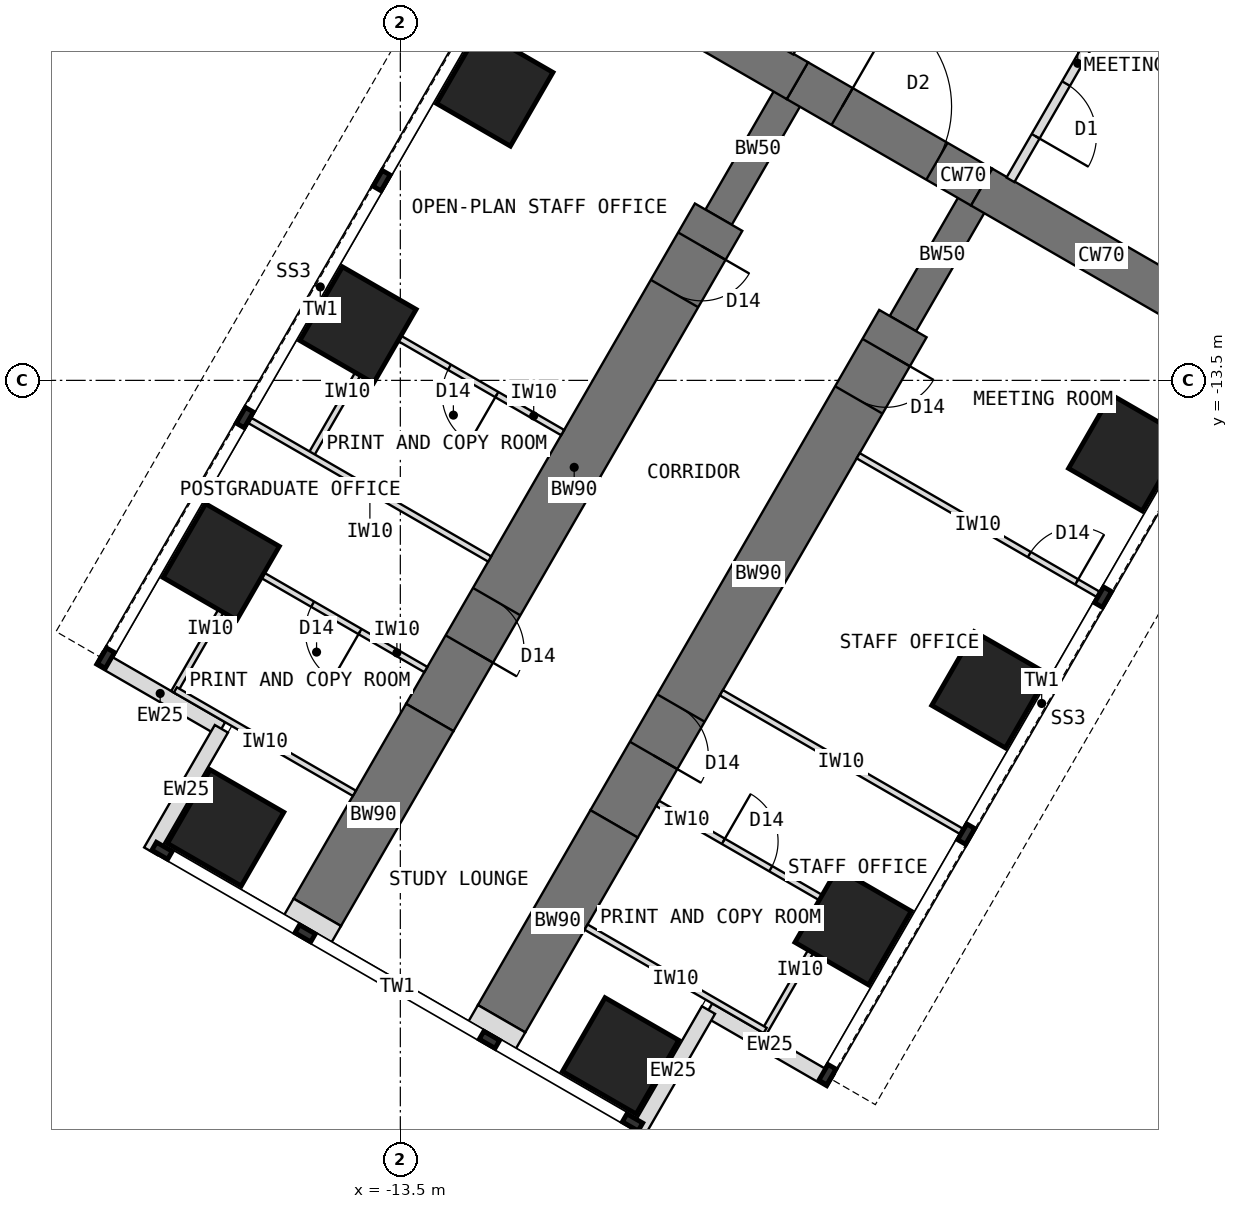
"""IFC4 building model, lengths in metres.
Left out: names, types, materials, properties, quantities, classifications, styles, units other than length and angle.
Written with IfcOpenShell. Run it as: python <this file> out.ifc"""

import sys

from ifc_helpers import new_model, si_unit, direction, frame, frame_2d, origin, origin_2d, place, context, subcontext, project, spatial, rectangle, extrude, element, fill, save


model = new_model("IFC4")
c1 = context("Model", 3, precision=1e-05, world=origin(), true_north=direction((0.0, 1.0)))
c2 = subcontext(c1, "Body", "Model", "MODEL_VIEW")
j1 = project(units=[si_unit("LENGTHUNIT", "METRE"), si_unit("PLANEANGLEUNIT", "RADIAN")], contexts=[c1])
p1 = place(None, origin())
s1 = spatial("IfcSite", under=j1, at=p1, CompositionType="ELEMENT")
p2 = place(p1, origin())
s2 = spatial("IfcBuilding", under=s1, at=p2, CompositionType="ELEMENT")
p3 = place(p2, frame((0.0, 0.0, 84.5)))
s3 = spatial("IfcBuildingStorey", under=s2, at=p3, CompositionType="ELEMENT", Elevation=84.5)
p4 = place(p3, frame((-10.908, -6.298, 0.0), z_axis=(0.0, 0.0, 1.0), x_axis=(0.866034513004, -0.499984222037, 0.0)))
e1 = element("IfcWall", 1, at=p4, inside=s3, PredefinedType="SHEAR", context=c2, shape_type="SweptSolid", body=[
    extrude(rectangle(XDim=4.548, YDim=0.7, at=frame_2d((2.274, 0.0))), origin(), (0.0, 0.0, 1.0), 4.0),
])
p5 = place(p3, frame((-6.97, -8.572, 0.0), z_axis=(0.0, 0.0, 1.0), x_axis=(0.866019471182, -0.500010275428, 0.0)))
e2 = element("IfcWall", 2, at=p5, inside=s3, PredefinedType="SHEAR", context=c2, shape_type="SweptSolid", body=[
    extrude(rectangle(XDim=3.5, YDim=0.7, at=frame_2d((1.75, 0.0))), origin(), (0.0, 0.0, 1.0), 4.0),
])
p6 = place(p5, frame((0.85, 0.0, 0.0)))
e3 = element("IfcOpeningElement", 3, at=p6, cuts=e2, PredefinedType="OPENING", context=c2, shape_type="SweptSolid", body=[
    extrude(rectangle(XDim=1.8, YDim=2.1, at=frame_2d((0.9, 1.05))), frame((0.0, 0.36, 0.0), z_axis=(0.0, -1.0, 0.0), x_axis=(1.0, 0.0, 0.0)), (0.0, 0.0, 1.0), 0.72),
])
p7 = place(p3, frame((-3.939, -10.322, 0.0), z_axis=(0.0, 0.0, 1.0), x_axis=(0.866011268655, -0.500024481964, 0.0)))
e4 = element("IfcWall", 4, at=p7, inside=s3, PredefinedType="SHEAR", context=c2, shape_type="SweptSolid", body=[
    extrude(rectangle(XDim=4.548, YDim=0.7, at=frame_2d((2.274, 0.0))), origin(), (0.0, 0.0, 1.0), 4.0),
])
p8 = place(p3, frame((-3.939, -10.322, 0.0), z_axis=(0.0, 0.0, 1.0), x_axis=(-0.499918158782, -0.866072649678, 0.0)))
e5 = element("IfcWall", 5, at=p8, inside=s3, PredefinedType="SHEAR", context=c2, shape_type="SweptSolid", body=[
    extrude(rectangle(XDim=2.592, YDim=0.5, at=frame_2d((1.296, 0.0))), origin(), (0.0, 0.0, 1.0), 4.0),
])
p9 = place(p3, frame((-5.234, -12.566, 0.0), z_axis=(0.0, 0.0, 1.0), x_axis=(-0.499997557548, -0.86602681393, 0.0)))
e6 = element("IfcWall", 6, at=p9, inside=s3, PredefinedType="SHEAR", context=c2, shape_type="SweptSolid", body=[
    extrude(rectangle(XDim=9.5, YDim=0.9, at=frame_2d((4.75, 0.0))), origin(), (0.0, 0.0, 1.0), 4.0),
])
p10 = place(p9, frame((0.55, 0.0, 0.0)))
e7 = element("IfcOpeningElement", 7, at=p10, cuts=e6, PredefinedType="OPENING", context=c2, shape_type="SweptSolid", body=[
    extrude(rectangle(XDim=0.9, YDim=2.1, at=frame_2d((0.45, 1.05))), frame((0.0, 0.46, 0.0), z_axis=(0.0, -1.0, 0.0), x_axis=(1.0, 0.0, 0.0)), (0.0, 0.0, 1.0), 0.92),
])
p11 = place(p9, frame((7.3, 0.0, 0.0)))
e8 = element("IfcOpeningElement", 8, at=p11, cuts=e6, PredefinedType="OPENING", context=c2, shape_type="SweptSolid", body=[
    extrude(rectangle(XDim=0.9, YDim=2.1, at=frame_2d((0.45, 1.05))), frame((0.0, 0.46, 0.0), z_axis=(0.0, -1.0, 0.0), x_axis=(1.0, 0.0, 0.0)), (0.0, 0.0, 1.0), 0.92),
])
p12 = place(p3, frame((-9.984, -20.794, 0.0), z_axis=(0.0, 0.0, 1.0), x_axis=(-0.500042316284, -0.866000971088, 0.0)))
e9 = element("IfcWall", 9, at=p12, inside=s3, PredefinedType="SHEAR", context=c2, shape_type="SweptSolid", body=[
    extrude(rectangle(XDim=3.7, YDim=0.9, at=frame_2d((1.85, 0.0))), origin(), (0.0, 0.0, 1.0), 4.0),
])
p13 = place(p3, frame((-6.97, -8.572, 0.0), z_axis=(0.0, 0.0, 1.0), x_axis=(-0.499988811324, -0.866031863473, 0.0)))
e10 = element("IfcWall", 10, at=p13, inside=s3, PredefinedType="SHEAR", context=c2, shape_type="SweptSolid", body=[
    extrude(rectangle(XDim=2.592, YDim=0.5, at=frame_2d((1.296, 0.0))), origin(), (0.0, 0.0, 1.0), 4.0),
])
p14 = place(p3, frame((-8.266, -10.816, 0.0), z_axis=(0.0, 0.0, 1.0), x_axis=(-0.499997557548, -0.86602681393, 0.0)))
e11 = element("IfcWall", 11, at=p14, inside=s3, PredefinedType="SHEAR", context=c2, shape_type="SweptSolid", body=[
    extrude(rectangle(XDim=9.5, YDim=0.9, at=frame_2d((4.75, 0.0))), origin(), (0.0, 0.0, 1.0), 4.0),
])
p15 = place(p14, frame((0.55, 0.0, 0.0)))
e12 = element("IfcOpeningElement", 12, at=p15, cuts=e11, PredefinedType="OPENING", context=c2, shape_type="SweptSolid", body=[
    extrude(rectangle(XDim=0.9, YDim=2.1, at=frame_2d((0.45, 1.05))), frame((0.0, 0.46, 0.0), z_axis=(0.0, -1.0, 0.0), x_axis=(1.0, 0.0, 0.0)), (0.0, 0.0, 1.0), 0.92),
])
p16 = place(p14, frame((7.3, 0.0, 0.0)))
e13 = element("IfcOpeningElement", 13, at=p16, cuts=e11, PredefinedType="OPENING", context=c2, shape_type="SweptSolid", body=[
    extrude(rectangle(XDim=0.9, YDim=2.1, at=frame_2d((0.45, 1.05))), frame((0.0, 0.46, 0.0), z_axis=(0.0, -1.0, 0.0), x_axis=(1.0, 0.0, 0.0)), (0.0, 0.0, 1.0), 0.92),
])
p17 = place(p3, frame((-13.016, -19.044, 0.0), z_axis=(0.0, 0.0, 1.0), x_axis=(-0.499992827086, -0.866029545028, 0.0)))
e14 = element("IfcWall", 14, at=p17, inside=s3, PredefinedType="SHEAR", context=c2, shape_type="SweptSolid", body=[
    extrude(rectangle(XDim=3.7, YDim=0.9, at=frame_2d((1.85, 0.0))), origin(), (0.0, 0.0, 1.0), 4.0),
])
for number, where, z_axis, x_axis in (
    (15, (-1.554, -14.691, 0.0), (0.0, 0.0, 1.0), (0.5, 0.866, 0.0)),
    (16, (-11.946, -8.691, 0.0), (0.0, 0.0, 1.0), (0.5, 0.866, 0.0)),
    (17, (-3.804, -18.588, 0.0), (0.0, 0.0, 1.0), (0.5, 0.866, 0.0)),
    (18, (-14.196, -12.588, 0.0), (0.0, 0.0, 1.0), (0.5, 0.866, 0.0)),
    (19, (-6.054, -22.486, 0.0), (0.0, 0.0, 1.0), (0.5, 0.866, 0.0)),
    (20, (-16.446, -16.486, 0.0), (0.0, 0.0, 1.0), (0.5, 0.866, 0.0)),
    (21, (-9.877, -24.608, 0.0), (0.0, 0.0, 1.0), (0.5, 0.866, 0.0)),
    (22, (-16.373, -20.858, 0.0), (0.0, 0.0, 1.0), (0.5, 0.866, 0.0)),
):
    element("IfcColumn", number, at=place(p3, frame(where, z_axis=z_axis, x_axis=x_axis)), inside=s3, PredefinedType="COLUMN", context=c2, shape_type="SweptSolid", body=[
        extrude(rectangle(XDim=1.4, YDim=1.4, at=origin_2d()), origin(), (0.0, 0.0, 1.0), 4.0),
    ])
for number, where, z_axis, x_axis in (
    (23, (-6.419, -25.017, 0.0), (0.0, 0.0, 1.0), (-0.866, 0.5, 0.0)),
    (24, (-8.432, -23.855, 0.0), (0.0, 0.0, 1.0), (-0.5, -0.866, 0.0)),
    (25, (-18.456, -18.067, 0.0), (0.0, 0.0, 1.0), (0.866, -0.5, 0.0)),
    (26, (-16.443, -19.23, 0.0), (0.0, 0.0, 1.0), (-0.5, -0.866, 0.0)),
):
    element("IfcWall", number, at=place(p3, frame(where, z_axis=z_axis, x_axis=x_axis)), inside=s3, PredefinedType="STANDARD", context=c2, shape_type="SweptSolid", body=[
        extrude(rectangle(XDim=2.325, YDim=0.25, at=frame_2d((1.163, 0.0))), origin(), (0.0, 0.0, 1.0), 3.8),
    ])
for number, where, z_axis, x_axis in (
    (27, (-11.834, -23.998, 0.0), (0.0, 0.0, 1.0), (-0.5, -0.866, 0.0)),
    (28, (-14.865, -22.248, 0.0), (0.0, 0.0, 1.0), (-0.5, -0.866, 0.0)),
):
    element("IfcWall", number, at=place(p3, frame(where, z_axis=z_axis, x_axis=x_axis)), inside=s3, PredefinedType="PARTITIONING", context=c2, shape_type="SweptSolid", body=[
        extrude(rectangle(XDim=0.31, YDim=0.9, at=frame_2d((0.155, 0.0))), origin(), (0.0, 0.0, 1.0), 3.8),
    ])
p18 = place(p3, frame((-1.201, -6.12, 0.0), z_axis=(0.0, 0.0, 1.0), x_axis=(0.500002627198, -0.866023886965, 0.0)))
e29 = element("IfcWall", 29, at=p18, inside=s3, PredefinedType="SHEAR", context=c2, shape_type="SweptSolid", body=[
    extrude(rectangle(XDim=5.858, YDim=0.4, at=frame_2d((2.929, 0.0))), origin(), (0.0, 0.0, 1.0), 4.0),
])
p19 = place(p3, frame((-5.97, -14.74, 0.0), z_axis=(0.0, 0.0, 1.0), x_axis=(0.866035472144, -0.499982560684, 0.0)))
e30 = element("IfcWall", 30, at=p19, inside=s3, PredefinedType="PARTITIONING", context=c2, shape_type="SweptSolid", body=[
    extrude(rectangle(XDim=4.55, YDim=0.1, at=frame_2d((2.275, 0.0))), origin(), (0.0, 0.0, 1.0), 3.8),
])
p20 = place(p19, frame((3.25, 0.0, 0.0)))
e31 = element("IfcOpeningElement", 31, at=p20, cuts=e30, PredefinedType="OPENING", context=c2, shape_type="SweptSolid", body=[
    extrude(rectangle(XDim=0.9, YDim=2.1, at=frame_2d((0.45, 1.05))), frame((0.0, 0.06, 0.0), z_axis=(0.0, -1.0, 0.0), x_axis=(1.0, 0.0, 0.0)), (0.0, 0.0, 1.0), 0.12),
])
p21 = place(p3, frame((-8.22, -18.637, 0.0), z_axis=(0.0, 0.0, 1.0), x_axis=(0.866012237902, -0.500022803284, 0.0)))
e32 = element("IfcWall", 32, at=p21, inside=s3, PredefinedType="PARTITIONING", context=c2, shape_type="SweptSolid", body=[
    extrude(rectangle(XDim=4.55, YDim=0.1, at=frame_2d((2.275, 0.0))), origin(), (0.0, 0.0, 1.0), 3.8),
])
p22 = place(p3, frame((-6.325, -22.156, 0.0), z_axis=(0.0, 0.0, 1.0), x_axis=(-0.500001309137, -0.866024647952, 0.0)))
e33 = element("IfcWall", 33, at=p22, inside=s3, PredefinedType="PARTITIONING", context=c2, shape_type="SweptSolid", body=[
    extrude(rectangle(XDim=2.4, YDim=0.1, at=frame_2d((1.2, 0.0))), origin(), (0.0, 0.0, 1.0), 3.8),
])
p23 = place(p3, frame((-9.27, -20.456, 0.0), z_axis=(0.0, 0.0, 1.0), x_axis=(0.866007419912, -0.500031147688, 0.0)))
e34 = element("IfcWall", 34, at=p23, inside=s3, PredefinedType="PARTITIONING", context=c2, shape_type="SweptSolid", body=[
    extrude(rectangle(XDim=3.4, YDim=0.1, at=frame_2d((1.7, 0.0))), origin(), (0.0, 0.0, 1.0), 3.8),
])
p24 = place(p23, frame((1.25, 0.0, 0.0)))
e35 = element("IfcOpeningElement", 35, at=p24, cuts=e34, PredefinedType="OPENING", context=c2, shape_type="SweptSolid", body=[
    extrude(rectangle(XDim=0.9, YDim=2.1, at=frame_2d((0.45, 1.05))), frame((0.0, 0.06, 0.0), z_axis=(0.0, -1.0, 0.0), x_axis=(1.0, 0.0, 0.0)), (0.0, 0.0, 1.0), 0.12),
])
p25 = place(p3, frame((-10.445, -22.491, 0.0), z_axis=(0.0, 0.0, 1.0), x_axis=(0.866007419912, -0.500031147688, 0.0)))
e36 = element("IfcWall", 36, at=p25, inside=s3, PredefinedType="PARTITIONING", context=c2, shape_type="SweptSolid", body=[
    extrude(rectangle(XDim=3.4, YDim=0.1, at=frame_2d((1.7, 0.0))), origin(), (0.0, 0.0, 1.0), 3.8),
])
p26 = place(p3, frame((-12.03, -16.437, 0.0), z_axis=(0.0, 0.0, 1.0), x_axis=(-0.866035472144, 0.499982560684, 0.0)))
e37 = element("IfcWall", 37, at=p26, inside=s3, PredefinedType="PARTITIONING", context=c2, shape_type="SweptSolid", body=[
    extrude(rectangle(XDim=4.55, YDim=0.1, at=frame_2d((2.275, 0.0))), origin(), (0.0, 0.0, 1.0), 3.8),
])
p27 = place(p3, frame((-13.775, -12.658, 0.0), z_axis=(0.0, 0.0, 1.0), x_axis=(-0.500033551112, -0.866006032174, 0.0)))
e38 = element("IfcWall", 38, at=p27, inside=s3, PredefinedType="PARTITIONING", context=c2, shape_type="SweptSolid", body=[
    extrude(rectangle(XDim=2.4, YDim=0.1, at=frame_2d((1.2, 0.0))), origin(), (0.0, 0.0, 1.0), 3.8),
])
p28 = place(p3, frame((-10.83, -14.359, 0.0), z_axis=(0.0, 0.0, 1.0), x_axis=(-0.865989465428, 0.500062241894, 0.0)))
e39 = element("IfcWall", 39, at=p28, inside=s3, PredefinedType="PARTITIONING", context=c2, shape_type="SweptSolid", body=[
    extrude(rectangle(XDim=3.4, YDim=0.1, at=frame_2d((1.7, 0.0))), origin(), (0.0, 0.0, 1.0), 3.8),
])
p29 = place(p28, frame((1.25, 0.0, 0.0)))
e40 = element("IfcOpeningElement", 40, at=p29, cuts=e39, PredefinedType="OPENING", context=c2, shape_type="SweptSolid", body=[
    extrude(rectangle(XDim=0.9, YDim=2.1, at=frame_2d((0.45, 1.05))), frame((0.0, 0.06, 0.0), z_axis=(0.0, -1.0, 0.0), x_axis=(1.0, 0.0, 0.0)), (0.0, 0.0, 1.0), 0.12),
])
p30 = place(p3, frame((-16.025, -16.556, 0.0), z_axis=(0.0, 0.0, 1.0), x_axis=(-0.500077600433, -0.865980596518, 0.0)))
e41 = element("IfcWall", 41, at=p30, inside=s3, PredefinedType="PARTITIONING", context=c2, shape_type="SweptSolid", body=[
    extrude(rectangle(XDim=2.4, YDim=0.1, at=frame_2d((1.2, 0.0))), origin(), (0.0, 0.0, 1.0), 3.8),
])
p31 = place(p3, frame((-13.08, -18.256, 0.0), z_axis=(0.0, 0.0, 1.0), x_axis=(-0.866020560687, 0.500008388397, 0.0)))
e42 = element("IfcWall", 42, at=p31, inside=s3, PredefinedType="PARTITIONING", context=c2, shape_type="SweptSolid", body=[
    extrude(rectangle(XDim=3.4, YDim=0.1, at=frame_2d((1.7, 0.0))), origin(), (0.0, 0.0, 1.0), 3.8),
])
p32 = place(p31, frame((1.25, 0.0, 0.0)))
e43 = element("IfcOpeningElement", 43, at=p32, cuts=e42, PredefinedType="OPENING", context=c2, shape_type="SweptSolid", body=[
    extrude(rectangle(XDim=0.9, YDim=2.1, at=frame_2d((0.45, 1.05))), frame((0.0, 0.06, 0.0), z_axis=(0.0, -1.0, 0.0), x_axis=(1.0, 0.0, 0.0)), (0.0, 0.0, 1.0), 0.12),
])
p33 = place(p3, frame((-14.255, -20.291, 0.0), z_axis=(0.0, 0.0, 1.0), x_axis=(-0.866020560687, 0.500008388397, 0.0)))
e44 = element("IfcWall", 44, at=p33, inside=s3, PredefinedType="PARTITIONING", context=c2, shape_type="SweptSolid", body=[
    extrude(rectangle(XDim=3.4, YDim=0.1, at=frame_2d((1.7, 0.0))), origin(), (0.0, 0.0, 1.0), 3.8),
])
p34 = place(p3, frame((-1.253, -6.37, 0.0), z_axis=(0.0, 0.0, 1.0), x_axis=(-0.500007369519, -0.866021148949, 0.0)))
e45 = element("IfcWall", 45, at=p34, inside=s3, PredefinedType="PARTITIONING", context=c2, shape_type="SweptSolid", body=[
    extrude(rectangle(XDim=4.426, YDim=0.15, at=frame_2d((2.213, 0.0))), origin(), (0.0, 0.0, 1.0), 3.8),
])
p35 = place(p34, frame((2.598, 0.0, 0.0)))
e46 = element("IfcOpeningElement", 46, at=p35, cuts=e45, PredefinedType="OPENING", context=c2, shape_type="SweptSolid", body=[
    extrude(rectangle(XDim=1.0, YDim=2.1, at=frame_2d((0.5, 1.05))), frame((0.0, 0.085, 0.0), z_axis=(0.0, -1.0, 0.0), x_axis=(1.0, 0.0, 0.0)), (0.0, 0.0, 1.0), 0.17),
])
p36 = place(p3, frame((-7.103, -8.103, 0.0), z_axis=(0.0, 0.0, 1.0), x_axis=(0.500007369519, 0.866021148949, 0.0)))
e47 = element("IfcWall", 47, at=p36, inside=s3, PredefinedType="PARTITIONING", context=c2, shape_type="SweptSolid", body=[
    extrude(rectangle(XDim=4.426, YDim=0.15, at=frame_2d((2.213, 0.0))), origin(), (0.0, 0.0, 1.0), 3.8),
])
p37 = place(p36, frame((0.828, 0.0, 0.0)))
e48 = element("IfcOpeningElement", 48, at=p37, cuts=e47, PredefinedType="OPENING", context=c2, shape_type="SweptSolid", body=[
    extrude(rectangle(XDim=1.0, YDim=2.1, at=frame_2d((0.5, 1.05))), frame((0.0, 0.085, 0.0), z_axis=(0.0, -1.0, 0.0), x_axis=(1.0, 0.0, 0.0)), (0.0, 0.0, 1.0), 0.17),
])
p38 = place(p6, origin())
e49 = element("IfcDoor", 49, at=p38, inside=s3, OperationType="DOUBLE_DOOR_DOUBLE_SWING", PredefinedType="DOOR", context=c2, shape_type="SweptSolid", body=[
    extrude(rectangle(XDim=1.72, YDim=2.06, at=frame_2d((0.9, 1.03))), frame((0.0, 0.025, 0.0), z_axis=(0.0, -1.0, 0.0), x_axis=(1.0, 0.0, 0.0)), (0.0, 0.0, 1.0), 0.05),
    extrude(rectangle(XDim=0.04, YDim=2.1, at=frame_2d((0.02, 1.05))), frame((0.0, 0.35, 0.0), z_axis=(0.0, -1.0, 0.0), x_axis=(1.0, 0.0, 0.0)), (0.0, 0.0, 1.0), 0.699),
    extrude(rectangle(XDim=0.04, YDim=2.1, at=frame_2d((1.78, 1.05))), frame((0.0, 0.35, 0.0), z_axis=(0.0, -1.0, 0.0), x_axis=(1.0, 0.0, 0.0)), (0.0, 0.0, 1.0), 0.699),
    extrude(rectangle(XDim=1.72, YDim=0.04, at=frame_2d((0.9, 2.08))), frame((0.0, 0.35, 0.0), z_axis=(0.0, -1.0, 0.0), x_axis=(1.0, 0.0, 0.0)), (0.0, 0.0, 1.0), 0.699),
])
fill(e3, e49)
p39 = place(p20, origin())
e50 = element("IfcDoor", 50, at=p39, inside=s3, OperationType="SINGLE_SWING_RIGHT", PredefinedType="DOOR", context=c2, shape_type="SweptSolid", body=[
    extrude(rectangle(XDim=0.9, YDim=2.1, at=frame_2d((0.45, 1.05))), frame((0.0, 0.025, 0.0), z_axis=(0.0, -1.0, 0.0), x_axis=(1.0, 0.0, 0.0)), (0.0, 0.0, 1.0), 0.05),
])
fill(e31, e50)
p40 = place(p24, origin())
e51 = element("IfcDoor", 51, at=p40, inside=s3, OperationType="SINGLE_SWING_LEFT", PredefinedType="DOOR", context=c2, shape_type="SweptSolid", body=[
    extrude(rectangle(XDim=0.9, YDim=2.1, at=frame_2d((0.45, 1.05))), frame((0.0, 0.025, 0.0), z_axis=(0.0, -1.0, 0.0), x_axis=(1.0, 0.0, 0.0)), (0.0, 0.0, 1.0), 0.05),
])
fill(e35, e51)
p41 = place(p29, origin())
e52 = element("IfcDoor", 52, at=p41, inside=s3, OperationType="SINGLE_SWING_LEFT", PredefinedType="DOOR", context=c2, shape_type="SweptSolid", body=[
    extrude(rectangle(XDim=0.9, YDim=2.1, at=frame_2d((0.45, 1.05))), frame((0.0, 0.025, 0.0), z_axis=(0.0, -1.0, 0.0), x_axis=(1.0, 0.0, 0.0)), (0.0, 0.0, 1.0), 0.05),
])
fill(e40, e52)
p42 = place(p32, origin())
e53 = element("IfcDoor", 53, at=p42, inside=s3, OperationType="SINGLE_SWING_LEFT", PredefinedType="DOOR", context=c2, shape_type="SweptSolid", body=[
    extrude(rectangle(XDim=0.9, YDim=2.1, at=frame_2d((0.45, 1.05))), frame((0.0, 0.025, 0.0), z_axis=(0.0, -1.0, 0.0), x_axis=(1.0, 0.0, 0.0)), (0.0, 0.0, 1.0), 0.05),
])
fill(e43, e53)
p43 = place(p35, origin())
e54 = element("IfcDoor", 54, at=p43, inside=s3, OperationType="SINGLE_SWING_RIGHT", PredefinedType="DOOR", context=c2, shape_type="SweptSolid", body=[
    extrude(rectangle(XDim=1.0, YDim=2.1, at=frame_2d((0.5, 1.05))), frame((0.0, 0.025, 0.0), z_axis=(0.0, -1.0, 0.0), x_axis=(1.0, 0.0, 0.0)), (0.0, 0.0, 1.0), 0.05),
])
fill(e46, e54)
p44 = place(p10, origin())
e55 = element("IfcDoor", 55, at=p44, inside=s3, OperationType="SINGLE_SWING_LEFT", PredefinedType="DOOR", context=c2, shape_type="SweptSolid", body=[
    extrude(rectangle(XDim=0.82, YDim=2.06, at=frame_2d((0.45, 1.03))), frame((0.0, 0.025, 0.0), z_axis=(0.0, -1.0, 0.0), x_axis=(1.0, 0.0, 0.0)), (0.0, 0.0, 1.0), 0.05),
    extrude(rectangle(XDim=0.04, YDim=2.1, at=frame_2d((0.02, 1.05))), frame((0.0, 0.45, 0.0), z_axis=(0.0, -1.0, 0.0), x_axis=(1.0, 0.0, 0.0)), (0.0, 0.0, 1.0), 0.899),
    extrude(rectangle(XDim=0.04, YDim=2.1, at=frame_2d((0.88, 1.05))), frame((0.0, 0.45, 0.0), z_axis=(0.0, -1.0, 0.0), x_axis=(1.0, 0.0, 0.0)), (0.0, 0.0, 1.0), 0.899),
    extrude(rectangle(XDim=0.82, YDim=0.04, at=frame_2d((0.45, 2.08))), frame((0.0, 0.45, 0.0), z_axis=(0.0, -1.0, 0.0), x_axis=(1.0, 0.0, 0.0)), (0.0, 0.0, 1.0), 0.899),
])
fill(e7, e55)
p45 = place(p11, origin())
e56 = element("IfcDoor", 56, at=p45, inside=s3, OperationType="SINGLE_SWING_RIGHT", PredefinedType="DOOR", context=c2, shape_type="SweptSolid", body=[
    extrude(rectangle(XDim=0.82, YDim=2.06, at=frame_2d((0.45, 1.03))), frame((0.0, 0.025, 0.0), z_axis=(0.0, -1.0, 0.0), x_axis=(1.0, 0.0, 0.0)), (0.0, 0.0, 1.0), 0.05),
    extrude(rectangle(XDim=0.04, YDim=2.1, at=frame_2d((0.02, 1.05))), frame((0.0, 0.45, 0.0), z_axis=(0.0, -1.0, 0.0), x_axis=(1.0, 0.0, 0.0)), (0.0, 0.0, 1.0), 0.899),
    extrude(rectangle(XDim=0.04, YDim=2.1, at=frame_2d((0.88, 1.05))), frame((0.0, 0.45, 0.0), z_axis=(0.0, -1.0, 0.0), x_axis=(1.0, 0.0, 0.0)), (0.0, 0.0, 1.0), 0.899),
    extrude(rectangle(XDim=0.82, YDim=0.04, at=frame_2d((0.45, 2.08))), frame((0.0, 0.45, 0.0), z_axis=(0.0, -1.0, 0.0), x_axis=(1.0, 0.0, 0.0)), (0.0, 0.0, 1.0), 0.899),
])
fill(e8, e56)
p46 = place(p15, origin())
e57 = element("IfcDoor", 57, at=p46, inside=s3, OperationType="SINGLE_SWING_LEFT", PredefinedType="DOOR", context=c2, shape_type="SweptSolid", body=[
    extrude(rectangle(XDim=0.82, YDim=2.06, at=frame_2d((0.45, 1.03))), frame((0.0, 0.025, 0.0), z_axis=(0.0, -1.0, 0.0), x_axis=(1.0, 0.0, 0.0)), (0.0, 0.0, 1.0), 0.05),
    extrude(rectangle(XDim=0.04, YDim=2.1, at=frame_2d((0.02, 1.05))), frame((0.0, 0.45, 0.0), z_axis=(0.0, -1.0, 0.0), x_axis=(1.0, 0.0, 0.0)), (0.0, 0.0, 1.0), 0.899),
    extrude(rectangle(XDim=0.04, YDim=2.1, at=frame_2d((0.88, 1.05))), frame((0.0, 0.45, 0.0), z_axis=(0.0, -1.0, 0.0), x_axis=(1.0, 0.0, 0.0)), (0.0, 0.0, 1.0), 0.899),
    extrude(rectangle(XDim=0.82, YDim=0.04, at=frame_2d((0.45, 2.08))), frame((0.0, 0.45, 0.0), z_axis=(0.0, -1.0, 0.0), x_axis=(1.0, 0.0, 0.0)), (0.0, 0.0, 1.0), 0.899),
])
fill(e12, e57)
p47 = place(p16, origin())
e58 = element("IfcDoor", 58, at=p47, inside=s3, OperationType="SINGLE_SWING_RIGHT", PredefinedType="DOOR", context=c2, shape_type="SweptSolid", body=[
    extrude(rectangle(XDim=0.82, YDim=2.06, at=frame_2d((0.45, 1.03))), frame((0.0, 0.025, 0.0), z_axis=(0.0, -1.0, 0.0), x_axis=(1.0, 0.0, 0.0)), (0.0, 0.0, 1.0), 0.05),
    extrude(rectangle(XDim=0.04, YDim=2.1, at=frame_2d((0.02, 1.05))), frame((0.0, 0.45, 0.0), z_axis=(0.0, -1.0, 0.0), x_axis=(1.0, 0.0, 0.0)), (0.0, 0.0, 1.0), 0.899),
    extrude(rectangle(XDim=0.04, YDim=2.1, at=frame_2d((0.88, 1.05))), frame((0.0, 0.45, 0.0), z_axis=(0.0, -1.0, 0.0), x_axis=(1.0, 0.0, 0.0)), (0.0, 0.0, 1.0), 0.899),
    extrude(rectangle(XDim=0.82, YDim=0.04, at=frame_2d((0.45, 2.08))), frame((0.0, 0.45, 0.0), z_axis=(0.0, -1.0, 0.0), x_axis=(1.0, 0.0, 0.0)), (0.0, 0.0, 1.0), 0.899),
])
fill(e13, e58)
save(model, sys.argv[1])
